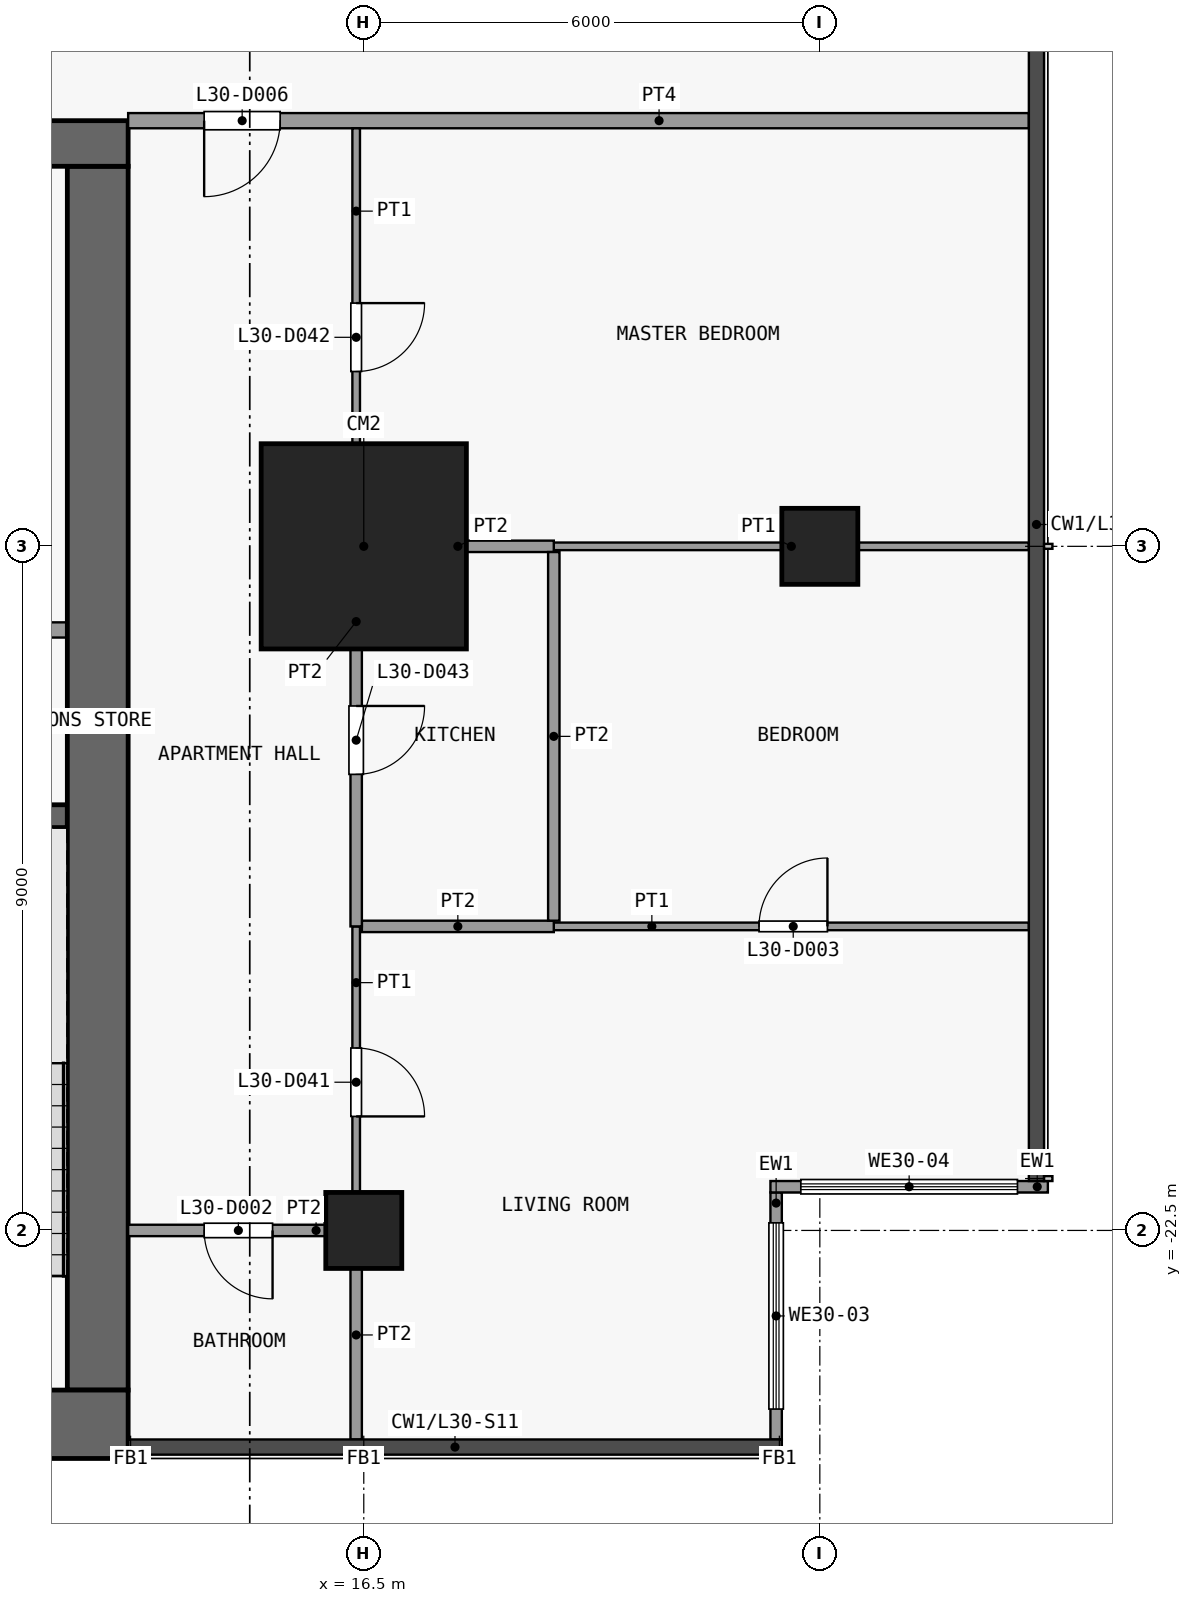
"""IFC4 building model, lengths in metres.
Left out: names, types, materials, properties, quantities, classifications, styles, units other than length and angle.
Written with IfcOpenShell. Run it as: python <this file> out.ifc"""

import sys

from ifc_helpers import new_model, si_unit, direction, frame, frame_2d, origin, origin_2d, place, context, subcontext, project, spatial, rectangle, extrude, element, fill, save


model = new_model("IFC4")
c1 = context("Model", 3, precision=1e-05, world=origin(), true_north=direction((0.0, 1.0)))
c2 = subcontext(c1, "Body", "Model", "MODEL_VIEW")
j1 = project(units=[si_unit("LENGTHUNIT", "METRE"), si_unit("PLANEANGLEUNIT", "RADIAN")], contexts=[c1])
p1 = place(None, origin())
s1 = spatial("IfcSite", under=j1, at=p1, CompositionType="ELEMENT")
p2 = place(p1, origin())
s2 = spatial("IfcBuilding", under=s1, at=p2, CompositionType="ELEMENT")
p3 = place(p2, frame((0.0, 0.0, 120.7)))
s3 = spatial("IfcBuildingStorey", under=s2, at=p3, CompositionType="ELEMENT", Elevation=120.7)
p4 = place(p3, frame((16.5, -22.5, 0.0), z_axis=(0.0, 0.0, 1.0), x_axis=(1.0, 0.0, 0.0)))
e1 = element("IfcColumn", 1, at=p4, inside=s3, PredefinedType="COLUMN", context=c2, shape_type="SweptSolid", body=[
    extrude(rectangle(XDim=1.0, YDim=1.0, at=origin_2d()), origin(), (0.0, 0.0, 1.0), 3.6),
])
p5 = place(p3, frame((16.5, -13.5, 0.0), z_axis=(0.0, 0.0, 1.0), x_axis=(1.0, 0.0, 0.0)))
e2 = element("IfcColumn", 2, at=p5, inside=s3, PredefinedType="COLUMN", context=c2, shape_type="SweptSolid", body=[
    extrude(rectangle(XDim=2.7, YDim=2.7, at=origin_2d()), origin(), (0.0, 0.0, 1.0), 3.6),
])
p6 = place(p3, frame((22.5, -13.5, 0.0), z_axis=(0.0, 0.0, 1.0), x_axis=(1.0, 0.0, 0.0)))
e3 = element("IfcColumn", 3, at=p6, inside=s3, PredefinedType="COLUMN", context=c2, shape_type="SweptSolid", body=[
    extrude(rectangle(XDim=1.0, YDim=1.0, at=origin_2d()), origin(), (0.0, 0.0, 1.0), 3.6),
])
p7 = place(p3, frame((-13.4, -25.05, 0.0), z_axis=(0.0, 0.0, 1.0), x_axis=(1.0, 0.0, 0.0)))
e4 = element("IfcWall", 4, at=p7, inside=s3, PredefinedType="SHEAR", context=c2, shape_type="SweptSolid", body=[
    extrude(rectangle(XDim=26.8, YDim=0.9, at=frame_2d((13.4, 0.0))), origin(), (0.0, 0.0, 1.0), 3.3),
])
p8 = place(p3, frame((-13.4, -8.2, 0.0), z_axis=(0.0, 0.0, 1.0), x_axis=(1.0, 0.0, 0.0)))
e5 = element("IfcWall", 5, at=p8, inside=s3, PredefinedType="SHEAR", context=c2, shape_type="SweptSolid", body=[
    extrude(rectangle(XDim=26.8, YDim=0.6, at=frame_2d((13.4, 0.0))), origin(), (0.0, 0.0, 1.0), 3.3),
])
p9 = place(p8, frame((7.7, 0.0, 0.0)))
e6 = element("IfcOpeningElement", 6, at=p9, cuts=e5, PredefinedType="OPENING", context=c2, shape_type="SweptSolid", body=[
    extrude(rectangle(XDim=1.8, YDim=2.1, at=frame_2d((0.9, 1.05))), frame((0.0, 0.31, 0.0), z_axis=(0.0, -1.0, 0.0), x_axis=(1.0, 0.0, 0.0)), (0.0, 0.0, 1.0), 0.62),
])
p10 = place(p8, frame((17.3, 0.0, 0.0)))
e7 = element("IfcOpeningElement", 7, at=p10, cuts=e5, PredefinedType="OPENING", context=c2, shape_type="SweptSolid", body=[
    extrude(rectangle(XDim=1.8, YDim=2.1, at=frame_2d((0.9, 1.05))), frame((0.0, 0.31, 0.0), z_axis=(0.0, -1.0, 0.0), x_axis=(1.0, 0.0, 0.0)), (0.0, 0.0, 1.0), 0.62),
])
p11 = place(p8, frame((1.625, 0.0, 0.0)))
e8 = element("IfcOpeningElement", 8, at=p11, cuts=e5, PredefinedType="OPENING", context=c2, shape_type="SweptSolid", body=[
    extrude(rectangle(XDim=1.2, YDim=2.1, at=frame_2d((0.6, 1.05))), frame((0.0, 0.31, 0.0), z_axis=(0.0, -1.0, 0.0), x_axis=(1.0, 0.0, 0.0)), (0.0, 0.0, 1.0), 0.62),
])
p12 = place(p8, frame((23.275, 0.0, 0.0)))
e9 = element("IfcOpeningElement", 9, at=p12, cuts=e5, PredefinedType="OPENING", context=c2, shape_type="SweptSolid", body=[
    extrude(rectangle(XDim=0.9, YDim=2.1, at=frame_2d((0.45, 1.05))), frame((0.0, 0.31, 0.0), z_axis=(0.0, -1.0, 0.0), x_axis=(1.0, 0.0, 0.0)), (0.0, 0.0, 1.0), 0.62),
])
p13 = place(p3, frame((13.0, -24.6, 0.0), z_axis=(0.0, 0.0, 1.0), x_axis=(0.0, 1.0, 0.0)))
e10 = element("IfcWall", 10, at=p13, inside=s3, PredefinedType="SHEAR", context=c2, shape_type="SweptSolid", body=[
    extrude(rectangle(XDim=16.1, YDim=0.8, at=frame_2d((8.05, 0.0))), origin(), (0.0, 0.0, 1.0), 3.3),
])
p14 = place(p3, frame((9.5, -17.05, 0.0), z_axis=(0.0, 0.0, 1.0), x_axis=(1.0, 0.0, 0.0)))
e11 = element("IfcWall", 11, at=p14, inside=s3, PredefinedType="SHEAR", context=c2, shape_type="SweptSolid", body=[
    extrude(rectangle(XDim=3.1, YDim=0.3, at=frame_2d((1.55, 0.0))), origin(), (0.0, 0.0, 1.0), 3.3),
])
p15 = place(p3, frame((11.15, -14.6, 0.0), z_axis=(0.0, 0.0, 1.0), x_axis=(1.0, 0.0, 0.0)))
e12 = element("IfcWall", 12, at=p15, inside=s3, PredefinedType="PARTITIONING", context=c2, shape_type="SweptSolid", body=[
    extrude(rectangle(XDim=1.45, YDim=0.2, at=frame_2d((0.725, 0.0))), origin(), (0.0, 0.0, 1.0), 3.3),
])
p16 = place(p3, frame((21.925, -22.0, 0.0), z_axis=(0.0, 0.0, 1.0), x_axis=(0.0, -1.0, 0.0)))
e13 = element("IfcWall", 13, at=p16, inside=s3, PredefinedType="SOLIDWALL", context=c2, shape_type="SweptSolid", body=[
    extrude(rectangle(XDim=3.25, YDim=0.15, at=frame_2d((1.625, 0.0))), origin(), (0.0, 0.0, 1.0), 3.3),
])
p17 = place(p16, frame((0.4, 0.0, 0.9)))
e14 = element("IfcOpeningElement", 14, at=p17, cuts=e13, PredefinedType="OPENING", context=c2, shape_type="SweptSolid", body=[
    extrude(rectangle(XDim=2.45, YDim=2.4, at=frame_2d((1.225, 1.2))), frame((0.0, 0.085, 0.0), z_axis=(0.0, -1.0, 0.0), x_axis=(1.0, 0.0, 0.0)), (0.0, 0.0, 1.0), 0.17),
])
p18 = place(p3, frame((25.5, -21.925, 0.0), z_axis=(0.0, 0.0, 1.0), x_axis=(-1.0, 0.0, 0.0)))
e15 = element("IfcWall", 15, at=p18, inside=s3, PredefinedType="SOLIDWALL", context=c2, shape_type="SweptSolid", body=[
    extrude(rectangle(XDim=3.65, YDim=0.15, at=frame_2d((1.825, 0.0))), origin(), (0.0, 0.0, 1.0), 3.3),
])
p19 = place(p18, frame((0.4, 0.0, 0.9)))
e16 = element("IfcOpeningElement", 16, at=p19, cuts=e15, PredefinedType="OPENING", context=c2, shape_type="SweptSolid", body=[
    extrude(rectangle(XDim=2.85, YDim=2.4, at=frame_2d((1.425, 1.2))), frame((0.0, 0.085, 0.0), z_axis=(0.0, -1.0, 0.0), x_axis=(1.0, 0.0, 0.0)), (0.0, 0.0, 1.0), 0.17),
])
p20 = place(p3, frame((13.4, -22.5, 0.0), z_axis=(0.0, 0.0, 1.0), x_axis=(1.0, 0.0, 0.0)))
e17 = element("IfcWall", 17, at=p20, inside=s3, PredefinedType="PARTITIONING", context=c2, shape_type="SweptSolid", body=[
    extrude(rectangle(XDim=2.925, YDim=0.15, at=frame_2d((1.462, 0.0))), origin(), (0.0, 0.0, 1.0), 3.3),
])
p21 = place(p20, frame((1.0, 0.0, 0.0)))
e18 = element("IfcOpeningElement", 18, at=p21, cuts=e17, PredefinedType="OPENING", context=c2, shape_type="SweptSolid", body=[
    extrude(rectangle(XDim=0.9, YDim=2.1, at=frame_2d((0.45, 1.05))), frame((0.0, 0.085, 0.0), z_axis=(0.0, -1.0, 0.0), x_axis=(1.0, 0.0, 0.0)), (0.0, 0.0, 1.0), 0.17),
])
p22 = place(p3, frame((19.0, -18.5, 0.0), z_axis=(0.0, 0.0, 1.0), x_axis=(1.0, 0.0, 0.0)))
e19 = element("IfcWall", 19, at=p22, inside=s3, PredefinedType="PARTITIONING", context=c2, shape_type="SweptSolid", body=[
    extrude(rectangle(XDim=6.25, YDim=0.1, at=frame_2d((3.125, 0.0))), origin(), (0.0, 0.0, 1.0), 3.3),
])
p23 = place(p22, frame((2.7, 0.0, 0.0)))
e20 = element("IfcOpeningElement", 20, at=p23, cuts=e19, PredefinedType="OPENING", context=c2, shape_type="SweptSolid", body=[
    extrude(rectangle(XDim=0.9, YDim=2.1, at=frame_2d((0.45, 1.05))), frame((0.0, 0.06, 0.0), z_axis=(0.0, -1.0, 0.0), x_axis=(1.0, 0.0, 0.0)), (0.0, 0.0, 1.0), 0.12),
])
p24 = place(p3, frame((16.475, -18.5, 0.0), z_axis=(0.0, 0.0, 1.0), x_axis=(1.0, 0.0, 0.0)))
e21 = element("IfcWall", 21, at=p24, inside=s3, PredefinedType="PARTITIONING", context=c2, shape_type="SweptSolid", body=[
    extrude(rectangle(XDim=2.525, YDim=0.15, at=frame_2d((1.262, 0.0))), origin(), (0.0, 0.0, 1.0), 3.3),
])
p25 = place(p3, frame((19.0, -13.5, 0.0), z_axis=(0.0, 0.0, 1.0), x_axis=(1.0, 0.0, 0.0)))
e22 = element("IfcWall", 22, at=p25, inside=s3, PredefinedType="PARTITIONING", context=c2, shape_type="SweptSolid", body=[
    extrude(rectangle(XDim=6.25, YDim=0.1, at=frame_2d((3.125, 0.0))), origin(), (0.0, 0.0, 1.0), 3.3),
])
p26 = place(p3, frame((16.475, -13.5, 0.0), z_axis=(0.0, 0.0, 1.0), x_axis=(1.0, 0.0, 0.0)))
e23 = element("IfcWall", 23, at=p26, inside=s3, PredefinedType="PARTITIONING", context=c2, shape_type="SweptSolid", body=[
    extrude(rectangle(XDim=2.525, YDim=0.15, at=frame_2d((1.262, 0.0))), origin(), (0.0, 0.0, 1.0), 3.3),
])
p27 = place(p3, frame((13.4, -7.9, 0.0), z_axis=(0.0, 0.0, 1.0), x_axis=(1.0, 0.0, 0.0)))
e24 = element("IfcWall", 24, at=p27, inside=s3, PredefinedType="PARTITIONING", context=c2, shape_type="SweptSolid", body=[
    extrude(rectangle(XDim=11.85, YDim=0.2, at=frame_2d((5.925, 0.0))), origin(), (0.0, 0.0, 1.0), 3.3),
])
p28 = place(p27, frame((1.0, 0.0, 0.0)))
e25 = element("IfcOpeningElement", 25, at=p28, cuts=e24, PredefinedType="OPENING", context=c2, shape_type="SweptSolid", body=[
    extrude(rectangle(XDim=1.0, YDim=2.1, at=frame_2d((0.5, 1.05))), frame((0.0, 0.11, 0.0), z_axis=(0.0, -1.0, 0.0), x_axis=(1.0, 0.0, 0.0)), (0.0, 0.0, 1.0), 0.22),
])
p29 = place(p3, frame((16.4, -22.5, 0.0), z_axis=(0.0, 0.0, 1.0), x_axis=(0.0, 1.0, 0.0)))
e26 = element("IfcWall", 26, at=p29, inside=s3, PredefinedType="PARTITIONING", context=c2, shape_type="SweptSolid", body=[
    extrude(rectangle(XDim=4.0, YDim=0.1, at=frame_2d((2.0, 0.0))), origin(), (0.0, 0.0, 1.0), 3.3),
])
p30 = place(p29, frame((1.5, 0.0, 0.0)))
e27 = element("IfcOpeningElement", 27, at=p30, cuts=e26, PredefinedType="OPENING", context=c2, shape_type="SweptSolid", body=[
    extrude(rectangle(XDim=0.9, YDim=2.1, at=frame_2d((0.45, 1.05))), frame((0.0, 0.06, 0.0), z_axis=(0.0, -1.0, 0.0), x_axis=(1.0, 0.0, 0.0)), (0.0, 0.0, 1.0), 0.12),
])
p31 = place(p3, frame((16.4, -13.5, 0.0), z_axis=(0.0, 0.0, 1.0), x_axis=(0.0, 1.0, 0.0)))
e28 = element("IfcWall", 28, at=p31, inside=s3, PredefinedType="PARTITIONING", context=c2, shape_type="SweptSolid", body=[
    extrude(rectangle(XDim=5.5, YDim=0.1, at=frame_2d((2.75, 0.0))), origin(), (0.0, 0.0, 1.0), 3.3),
])
p32 = place(p31, frame((2.3, 0.0, 0.0)))
e29 = element("IfcOpeningElement", 29, at=p32, cuts=e28, PredefinedType="OPENING", context=c2, shape_type="SweptSolid", body=[
    extrude(rectangle(XDim=0.9, YDim=2.1, at=frame_2d((0.45, 1.05))), frame((0.0, 0.06, 0.0), z_axis=(0.0, -1.0, 0.0), x_axis=(1.0, 0.0, 0.0)), (0.0, 0.0, 1.0), 0.12),
])
p33 = place(p3, frame((16.4, -25.25, 0.0), z_axis=(0.0, 0.0, 1.0), x_axis=(0.0, 1.0, 0.0)))
e30 = element("IfcWall", 30, at=p33, inside=s3, PredefinedType="PARTITIONING", context=c2, shape_type="SweptSolid", body=[
    extrude(rectangle(XDim=2.75, YDim=0.15, at=frame_2d((1.375, 0.0))), origin(), (0.0, 0.0, 1.0), 3.3),
])
p34 = place(p3, frame((16.4, -18.5, 0.0), z_axis=(0.0, 0.0, 1.0), x_axis=(0.0, 1.0, 0.0)))
e31 = element("IfcWall", 31, at=p34, inside=s3, PredefinedType="PARTITIONING", context=c2, shape_type="SweptSolid", body=[
    extrude(rectangle(XDim=5.0, YDim=0.15, at=frame_2d((2.5, 0.0))), origin(), (0.0, 0.0, 1.0), 3.3),
])
p35 = place(p34, frame((2.0, 0.0, 0.0)))
e32 = element("IfcOpeningElement", 32, at=p35, cuts=e31, PredefinedType="OPENING", context=c2, shape_type="SweptSolid", body=[
    extrude(rectangle(XDim=0.9, YDim=2.1, at=frame_2d((0.45, 1.05))), frame((0.0, 0.085, 0.0), z_axis=(0.0, -1.0, 0.0), x_axis=(1.0, 0.0, 0.0)), (0.0, 0.0, 1.0), 0.17),
])
p36 = place(p3, frame((19.0, -18.425, 0.0), z_axis=(0.0, 0.0, 1.0), x_axis=(0.0, 1.0, 0.0)))
e33 = element("IfcWall", 33, at=p36, inside=s3, PredefinedType="PARTITIONING", context=c2, shape_type="SweptSolid", body=[
    extrude(rectangle(XDim=4.85, YDim=0.15, at=frame_2d((2.425, 0.0))), origin(), (0.0, 0.0, 1.0), 3.3),
])
p37 = place(p17, origin())
e34 = element("IfcWindow", 34, at=p37, inside=s3, PartitioningType="SINGLE_PANEL", PredefinedType="WINDOW", context=c2, shape_type="SweptSolid", body=[
    extrude(rectangle(XDim=2.45, YDim=2.4, at=frame_2d((1.225, 1.2))), frame((0.0, 0.03, 0.0), z_axis=(0.0, -1.0, 0.0), x_axis=(1.0, 0.0, 0.0)), (0.0, 0.0, 1.0), 0.06),
])
fill(e14, e34)
p38 = place(p19, origin())
e35 = element("IfcWindow", 35, at=p38, inside=s3, PartitioningType="SINGLE_PANEL", PredefinedType="WINDOW", context=c2, shape_type="SweptSolid", body=[
    extrude(rectangle(XDim=2.85, YDim=2.4, at=frame_2d((1.425, 1.2))), frame((0.0, 0.03, 0.0), z_axis=(0.0, -1.0, 0.0), x_axis=(1.0, 0.0, 0.0)), (0.0, 0.0, 1.0), 0.06),
])
fill(e16, e35)
p39 = place(p21, origin())
e36 = element("IfcDoor", 36, at=p39, inside=s3, OperationType="SINGLE_SWING_RIGHT", PredefinedType="DOOR", context=c2, shape_type="SweptSolid", body=[
    extrude(rectangle(XDim=0.9, YDim=2.1, at=frame_2d((0.45, 1.05))), frame((0.0, 0.025, 0.0), z_axis=(0.0, -1.0, 0.0), x_axis=(1.0, 0.0, 0.0)), (0.0, 0.0, 1.0), 0.05),
])
fill(e18, e36)
p40 = place(p23, origin())
e37 = element("IfcDoor", 37, at=p40, inside=s3, OperationType="SINGLE_SWING_LEFT", PredefinedType="DOOR", context=c2, shape_type="SweptSolid", body=[
    extrude(rectangle(XDim=0.9, YDim=2.1, at=frame_2d((0.45, 1.05))), frame((0.0, 0.025, 0.0), z_axis=(0.0, -1.0, 0.0), x_axis=(1.0, 0.0, 0.0)), (0.0, 0.0, 1.0), 0.05),
])
fill(e20, e37)
p41 = place(p28, origin())
e38 = element("IfcDoor", 38, at=p41, inside=s3, OperationType="SINGLE_SWING_LEFT", PredefinedType="DOOR", context=c2, shape_type="SweptSolid", body=[
    extrude(rectangle(XDim=1.0, YDim=2.1, at=frame_2d((0.5, 1.05))), frame((0.0, 0.025, 0.0), z_axis=(0.0, -1.0, 0.0), x_axis=(1.0, 0.0, 0.0)), (0.0, 0.0, 1.0), 0.05),
])
fill(e25, e38)
p42 = place(p30, origin())
e39 = element("IfcDoor", 39, at=p42, inside=s3, OperationType="SINGLE_SWING_LEFT", PredefinedType="DOOR", context=c2, shape_type="SweptSolid", body=[
    extrude(rectangle(XDim=0.9, YDim=2.1, at=frame_2d((0.45, 1.05))), frame((0.0, 0.025, 0.0), z_axis=(0.0, -1.0, 0.0), x_axis=(1.0, 0.0, 0.0)), (0.0, 0.0, 1.0), 0.05),
])
fill(e27, e39)
p43 = place(p32, origin())
e40 = element("IfcDoor", 40, at=p43, inside=s3, OperationType="SINGLE_SWING_RIGHT", PredefinedType="DOOR", context=c2, shape_type="SweptSolid", body=[
    extrude(rectangle(XDim=0.9, YDim=2.1, at=frame_2d((0.45, 1.05))), frame((0.0, 0.025, 0.0), z_axis=(0.0, -1.0, 0.0), x_axis=(1.0, 0.0, 0.0)), (0.0, 0.0, 1.0), 0.05),
])
fill(e29, e40)
p44 = place(p35, origin())
e41 = element("IfcDoor", 41, at=p44, inside=s3, OperationType="SINGLE_SWING_RIGHT", PredefinedType="DOOR", context=c2, shape_type="SweptSolid", body=[
    extrude(rectangle(XDim=0.9, YDim=2.1, at=frame_2d((0.45, 1.05))), frame((0.0, 0.025, 0.0), z_axis=(0.0, -1.0, 0.0), x_axis=(1.0, 0.0, 0.0)), (0.0, 0.0, 1.0), 0.05),
])
fill(e32, e41)
save(model, sys.argv[1])
